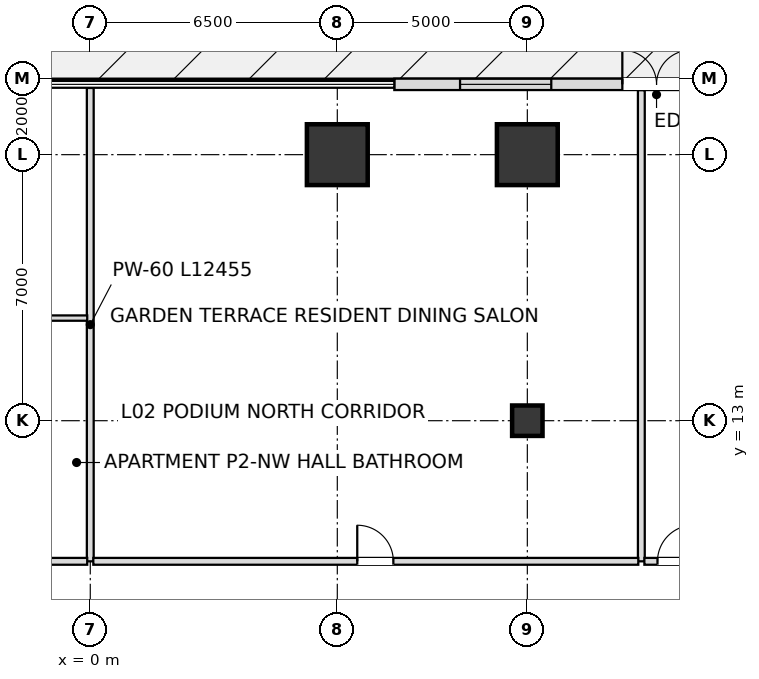
"""IFC4 building model, lengths in metres.
Left out: names, types, materials, properties, quantities, classifications, styles, units other than length and angle.
Written with IfcOpenShell. Run it as: python <this file> out.ifc"""

import sys

from ifc_helpers import new_model, si_unit, direction, frame, frame_2d, origin, origin_2d, place, context, subcontext, project, spatial, rectangle, extrude, element, fill, save


model = new_model("IFC4")
c1 = context("Model", 3, precision=1e-05, world=origin(), true_north=direction((0.0, 1.0)))
c2 = subcontext(c1, "Body", "Model", "MODEL_VIEW")
j1 = project(units=[si_unit("LENGTHUNIT", "METRE"), si_unit("PLANEANGLEUNIT", "RADIAN")], contexts=[c1])
p1 = place(None, origin())
s1 = spatial("IfcSite", under=j1, at=p1, CompositionType="ELEMENT")
p2 = place(p1, origin())
s2 = spatial("IfcBuilding", under=s1, at=p2, CompositionType="ELEMENT")
p3 = place(p2, frame((0.0, 0.0, 11.4)))
s3 = spatial("IfcBuildingStorey", under=s2, at=p3, CompositionType="ELEMENT", Elevation=11.4)
for number, where, z_axis, x_axis in (
    (1, (11.5, 20.0, 0.0), (0.0, 0.0, 1.0), (1.0, 0.0, 0.0)),
    (2, (6.5, 20.0, 0.0), (0.0, 0.0, 1.0), (1.0, 0.0, 0.0)),
):
    element("IfcColumn", number, at=place(p3, frame(where, z_axis=z_axis, x_axis=x_axis)), inside=s3, PredefinedType="USERDEFINED", context=c2, shape_type="SweptSolid", body=[
        extrude(rectangle(XDim=1.6, YDim=1.6, at=origin_2d()), origin(), (0.0, 0.0, 1.0), 5.4),
    ])
p4 = place(p3, frame((11.5, 13.0, 0.0), z_axis=(0.0, 0.0, 1.0), x_axis=(1.0, 0.0, 0.0)))
e3 = element("IfcColumn", 3, at=p4, inside=s3, PredefinedType="COLUMN", context=c2, shape_type="SweptSolid", body=[
    extrude(rectangle(XDim=0.8, YDim=0.8, at=origin_2d()), origin(), (0.0, 0.0, 1.0), 5.4),
])
p5 = place(p3, frame((8.0, 21.85, 0.0), z_axis=(0.0, 0.0, 1.0), x_axis=(1.0, 0.0, 0.0)))
e4 = element("IfcWall", 4, at=p5, inside=s3, PredefinedType="SOLIDWALL", context=c2, shape_type="SweptSolid", body=[
    extrude(rectangle(XDim=14.85, YDim=0.3, at=frame_2d((7.425, 0.0))), origin(), (0.0, 0.0, 1.0), 5.12),
])
p6 = place(p5, frame((6.0, 0.0, 0.0)))
e5 = element("IfcOpeningElement", 5, at=p6, cuts=e4, PredefinedType="OPENING", context=c2, shape_type="SweptSolid", body=[
    extrude(rectangle(XDim=1.8, YDim=2.3, at=frame_2d((0.9, 1.15))), frame((0.0, 0.16, 0.0), z_axis=(0.0, -1.0, 0.0), x_axis=(1.0, 0.0, 0.0)), (0.0, 0.0, 1.0), 0.32),
])
p7 = place(p5, frame((1.73, 0.0, 0.8)))
e6 = element("IfcOpeningElement", 6, at=p7, cuts=e4, PredefinedType="OPENING", context=c2, shape_type="SweptSolid", body=[
    extrude(rectangle(XDim=2.4, YDim=2.2, at=frame_2d((1.2, 1.1))), frame((0.0, 0.16, 0.0), z_axis=(0.0, -1.0, 0.0), x_axis=(1.0, 0.0, 0.0)), (0.0, 0.0, 1.0), 0.32),
])
p8 = place(p5, frame((8.51, 0.0, 0.8)))
e7 = element("IfcOpeningElement", 7, at=p8, cuts=e4, PredefinedType="OPENING", context=c2, shape_type="SweptSolid", body=[
    extrude(rectangle(XDim=2.4, YDim=2.2, at=frame_2d((1.2, 1.1))), frame((0.0, 0.16, 0.0), z_axis=(0.0, -1.0, 0.0), x_axis=(1.0, 0.0, 0.0)), (0.0, 0.0, 1.0), 0.32),
])
p9 = place(p5, frame((11.73, 0.0, 0.8)))
e8 = element("IfcOpeningElement", 8, at=p9, cuts=e4, PredefinedType="OPENING", context=c2, shape_type="SweptSolid", body=[
    extrude(rectangle(XDim=2.4, YDim=2.2, at=frame_2d((1.2, 1.1))), frame((0.0, 0.16, 0.0), z_axis=(0.0, -1.0, 0.0), x_axis=(1.0, 0.0, 0.0)), (0.0, 0.0, 1.0), 0.32),
])
p10 = place(p3, frame((0.0, 9.3, 0.0), z_axis=(0.0, 0.0, 1.0), x_axis=(0.0, 1.0, 0.0)))
e9 = element("IfcWall", 9, at=p10, inside=s3, PredefinedType="PARTITIONING", context=c2, shape_type="SweptSolid", body=[
    extrude(rectangle(XDim=12.455, YDim=0.18, at=frame_2d((6.228, 0.0))), origin(), (0.0, 0.0, 1.0), 4.476),
])
p11 = place(p3, frame((14.5, 9.3, 0.0), z_axis=(0.0, 0.0, 1.0), x_axis=(0.0, 1.0, 0.0)))
e10 = element("IfcWall", 10, at=p11, inside=s3, PredefinedType="PARTITIONING", context=c2, shape_type="SweptSolid", body=[
    extrude(rectangle(XDim=12.395, YDim=0.18, at=frame_2d((6.198, 0.0))), origin(), (0.0, 0.0, 1.0), 4.41),
])
p12 = place(p3, frame((-1.87, 9.3, 0.0), z_axis=(0.0, 0.0, 1.0), x_axis=(1.0, 0.0, 0.0)))
e11 = element("IfcWall", 11, at=p12, inside=s3, PredefinedType="PARTITIONING", context=c2, shape_type="SweptSolid", body=[
    extrude(rectangle(XDim=1.79, YDim=0.18, at=frame_2d((0.895, 0.0))), origin(), (0.0, 0.0, 1.0), 5.12),
])
p13 = place(p3, frame((0.08, 9.3, 0.0), z_axis=(0.0, 0.0, 1.0), x_axis=(1.0, 0.0, 0.0)))
e12 = element("IfcWall", 12, at=p13, inside=s3, PredefinedType="PARTITIONING", context=c2, shape_type="SweptSolid", body=[
    extrude(rectangle(XDim=14.34, YDim=0.18, at=frame_2d((7.17, 0.0))), origin(), (0.0, 0.0, 1.0), 4.41),
])
p14 = place(p13, frame((6.945, 0.0, 0.0)))
e13 = element("IfcOpeningElement", 13, at=p14, cuts=e12, PredefinedType="OPENING", context=c2, shape_type="SweptSolid", body=[
    extrude(rectangle(XDim=0.95, YDim=2.15, at=frame_2d((0.475, 1.075))), frame((0.0, 0.1, 0.0), z_axis=(0.0, -1.0, 0.0), x_axis=(1.0, 0.0, 0.0)), (0.0, 0.0, 1.0), 0.2),
])
p15 = place(p3, frame((14.58, 9.3, 0.0), z_axis=(0.0, 0.0, 1.0), x_axis=(1.0, 0.0, 0.0)))
e14 = element("IfcWall", 14, at=p15, inside=s3, PredefinedType="PARTITIONING", context=c2, shape_type="SweptSolid", body=[
    extrude(rectangle(XDim=8.155, YDim=0.18, at=frame_2d((4.078, 0.0))), origin(), (0.0, 0.0, 1.0), 4.41),
])
p16 = place(p15, frame((0.345, 0.0, 0.0)))
e15 = element("IfcOpeningElement", 15, at=p16, cuts=e14, PredefinedType="OPENING", context=c2, shape_type="SweptSolid", body=[
    extrude(rectangle(XDim=0.95, YDim=2.15, at=frame_2d((0.475, 1.075))), frame((0.0, 0.1, 0.0), z_axis=(0.0, -1.0, 0.0), x_axis=(1.0, 0.0, 0.0)), (0.0, 0.0, 1.0), 0.2),
])
p17 = place(p3, frame((-1.87, 15.7, 0.0), z_axis=(0.0, 0.0, 1.0), x_axis=(1.0, 0.0, 0.0)))
e16 = element("IfcWall", 16, at=p17, inside=s3, PredefinedType="PARTITIONING", context=c2, shape_type="SweptSolid", body=[
    extrude(rectangle(XDim=1.79, YDim=0.14, at=frame_2d((0.895, 0.0))), origin(), (0.0, 0.0, 1.0), 5.12),
])
p18 = place(p6, origin())
e17 = element("IfcDoor", 17, at=p18, inside=s3, OperationType="DOUBLE_DOOR_SINGLE_SWING", PredefinedType="DOOR", context=c2, shape_type="SweptSolid", body=[
    extrude(rectangle(XDim=1.8, YDim=2.3, at=frame_2d((0.9, 1.15))), frame((0.0, 0.025, 0.0), z_axis=(0.0, -1.0, 0.0), x_axis=(1.0, 0.0, 0.0)), (0.0, 0.0, 1.0), 0.05),
])
fill(e5, e17)
p19 = place(p7, origin())
e18 = element("IfcWindow", 18, at=p19, inside=s3, PartitioningType="SINGLE_PANEL", PredefinedType="WINDOW", context=c2, shape_type="SweptSolid", body=[
    extrude(rectangle(XDim=2.4, YDim=2.2, at=frame_2d((1.2, 1.1))), frame((0.0, 0.03, 0.0), z_axis=(0.0, -1.0, 0.0), x_axis=(1.0, 0.0, 0.0)), (0.0, 0.0, 1.0), 0.06),
])
fill(e6, e18)
p20 = place(p14, origin())
e19 = element("IfcDoor", 19, at=p20, inside=s3, OperationType="SINGLE_SWING_LEFT", PredefinedType="DOOR", context=c2, shape_type="SweptSolid", body=[
    extrude(rectangle(XDim=0.95, YDim=2.15, at=frame_2d((0.475, 1.075))), frame((0.0, 0.025, 0.0), z_axis=(0.0, -1.0, 0.0), x_axis=(1.0, 0.0, 0.0)), (0.0, 0.0, 1.0), 0.05),
])
fill(e13, e19)
p21 = place(p16, origin())
e20 = element("IfcDoor", 20, at=p21, inside=s3, OperationType="SINGLE_SWING_RIGHT", PredefinedType="DOOR", context=c2, shape_type="SweptSolid", body=[
    extrude(rectangle(XDim=0.95, YDim=2.15, at=frame_2d((0.475, 1.075))), frame((0.0, 0.025, 0.0), z_axis=(0.0, -1.0, 0.0), x_axis=(1.0, 0.0, 0.0)), (0.0, 0.0, 1.0), 0.05),
])
fill(e15, e20)
save(model, sys.argv[1])
